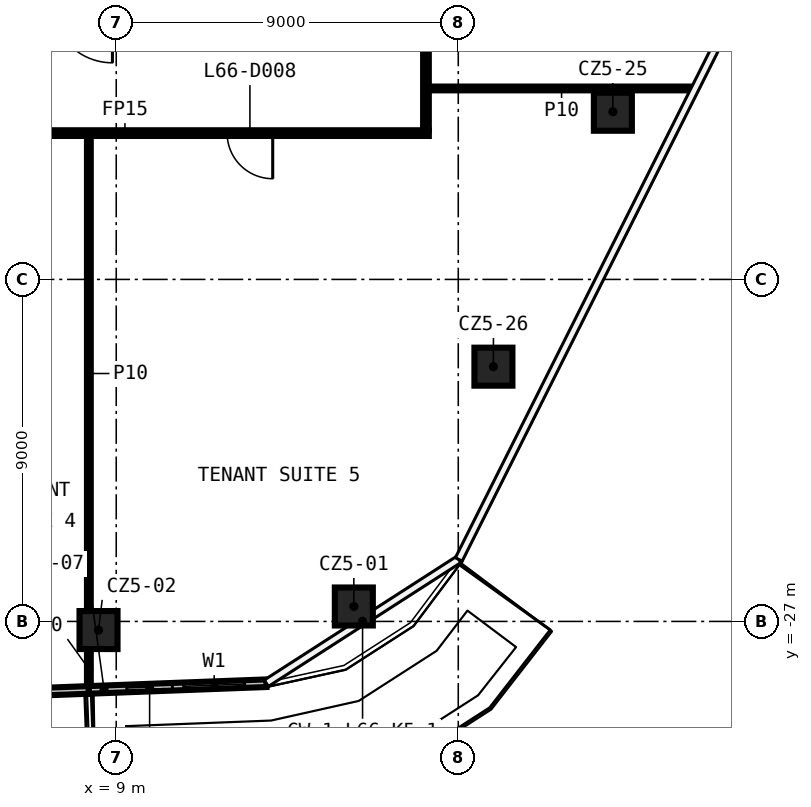
"""IFC4 building model, lengths in metres.
Left out: names, types, materials, properties, quantities, classifications, styles, units other than length and angle.
Written with IfcOpenShell. Run it as: python <this file> out.ifc"""

import sys

from ifc_helpers import new_model, si_unit, direction, frame, frame_2d, origin, origin_2d, place, context, subcontext, project, spatial, rectangle, extrude, element, fill, save


model = new_model("IFC4")
c1 = context("Model", 3, precision=1e-05, world=origin(), true_north=direction((0.0, 1.0)))
c2 = subcontext(c1, "Body", "Model", "MODEL_VIEW")
j1 = project(units=[si_unit("LENGTHUNIT", "METRE"), si_unit("PLANEANGLEUNIT", "RADIAN")], contexts=[c1])
p1 = place(None, origin())
s1 = spatial("IfcSite", under=j1, at=p1, CompositionType="ELEMENT")
p2 = place(p1, origin())
s2 = spatial("IfcBuilding", under=s1, at=p2, CompositionType="ELEMENT")
p3 = place(p2, frame((0.0, 0.0, 311.0)))
s3 = spatial("IfcBuildingStorey", under=s2, at=p3, CompositionType="ELEMENT", Elevation=311.0)
for number, where, z_axis, x_axis in (
    (1, (15.252, -26.607, 0.0), (0.0, 0.0, 1.0), (1.0, 0.0, 0.0)),
    (2, (8.534, -27.227, 0.0), (0.0, 0.0, 1.0), (1.0, 0.0, 0.0)),
    (3, (22.068, -13.588, 0.0), (0.0, 0.0, 1.0), (1.0, 0.0, 0.0)),
    (4, (18.925, -20.296, 0.0), (0.0, 0.0, 1.0), (1.0, 0.0, 0.0)),
):
    element("IfcColumn", number, at=place(p3, frame(where, z_axis=z_axis, x_axis=x_axis)), inside=s3, PredefinedType="COLUMN", context=c2, shape_type="SweptSolid", body=[
        extrude(rectangle(XDim=1.0, YDim=1.0, at=origin_2d()), origin(), (0.0, 0.0, 1.0), 3.82),
    ])
p4 = place(p3, frame((17.225, -14.15, 0.0), z_axis=(0.0, 0.0, 1.0), x_axis=(-1.0, 0.0, 0.0)))
e5 = element("IfcWall", 5, at=p4, inside=s3, PredefinedType="PARTITIONING", context=c2, shape_type="SweptSolid", body=[
    extrude(rectangle(XDim=34.45, YDim=0.15, at=frame_2d((17.225, 0.0))), origin(), (0.0, 0.0, 1.0), 3.82),
])
p5 = place(p4, frame((31.269, 0.0, 0.0)))
e6 = element("IfcOpeningElement", 6, at=p5, cuts=e5, PredefinedType="OPENING", context=c2, shape_type="SweptSolid", body=[
    extrude(rectangle(XDim=1.2, YDim=2.1, at=frame_2d((0.6, 1.05))), frame((0.0, 0.085, 0.0), z_axis=(0.0, -1.0, 0.0), x_axis=(1.0, 0.0, 0.0)), (0.0, 0.0, 1.0), 0.17),
])
p6 = place(p4, frame((24.719, 0.0, 0.0)))
e7 = element("IfcOpeningElement", 7, at=p6, cuts=e5, PredefinedType="OPENING", context=c2, shape_type="SweptSolid", body=[
    extrude(rectangle(XDim=1.2, YDim=2.1, at=frame_2d((0.6, 1.05))), frame((0.0, 0.085, 0.0), z_axis=(0.0, -1.0, 0.0), x_axis=(1.0, 0.0, 0.0)), (0.0, 0.0, 1.0), 0.17),
])
p7 = place(p4, frame((20.044, 0.0, 0.0)))
e8 = element("IfcOpeningElement", 8, at=p7, cuts=e5, PredefinedType="OPENING", context=c2, shape_type="SweptSolid", body=[
    extrude(rectangle(XDim=1.2, YDim=2.1, at=frame_2d((0.6, 1.05))), frame((0.0, 0.085, 0.0), z_axis=(0.0, -1.0, 0.0), x_axis=(1.0, 0.0, 0.0)), (0.0, 0.0, 1.0), 0.17),
])
p8 = place(p4, frame((15.364, 0.0, 0.0)))
e9 = element("IfcOpeningElement", 9, at=p8, cuts=e5, PredefinedType="OPENING", context=c2, shape_type="SweptSolid", body=[
    extrude(rectangle(XDim=1.2, YDim=2.1, at=frame_2d((0.6, 1.05))), frame((0.0, 0.085, 0.0), z_axis=(0.0, -1.0, 0.0), x_axis=(1.0, 0.0, 0.0)), (0.0, 0.0, 1.0), 0.17),
])
p9 = place(p4, frame((10.685, 0.0, 0.0)))
e10 = element("IfcOpeningElement", 10, at=p9, cuts=e5, PredefinedType="OPENING", context=c2, shape_type="SweptSolid", body=[
    extrude(rectangle(XDim=1.2, YDim=2.1, at=frame_2d((0.6, 1.05))), frame((0.0, 0.085, 0.0), z_axis=(0.0, -1.0, 0.0), x_axis=(1.0, 0.0, 0.0)), (0.0, 0.0, 1.0), 0.17),
])
p10 = place(p4, frame((4.107, 0.0, 0.0)))
e11 = element("IfcOpeningElement", 11, at=p10, cuts=e5, PredefinedType="OPENING", context=c2, shape_type="SweptSolid", body=[
    extrude(rectangle(XDim=1.2, YDim=2.1, at=frame_2d((0.6, 1.05))), frame((0.0, 0.085, 0.0), z_axis=(0.0, -1.0, 0.0), x_axis=(1.0, 0.0, 0.0)), (0.0, 0.0, 1.0), 0.17),
])
p11 = place(p3, frame((17.225, -12.975, 0.0), z_axis=(0.0, 0.0, 1.0), x_axis=(1.0, 0.0, 0.0)))
e12 = element("IfcWall", 12, at=p11, inside=s3, PredefinedType="PARTITIONING", context=c2, shape_type="SweptSolid", body=[
    extrude(rectangle(XDim=6.987, YDim=0.1, at=frame_2d((3.493, 0.0))), origin(), (0.0, 0.0, 1.0), 3.82),
])
p12 = place(p3, frame((17.15, 14.075, 0.0), z_axis=(0.0, 0.0, 1.0), x_axis=(0.0, -1.0, 0.0)))
e13 = element("IfcWall", 13, at=p12, inside=s3, PredefinedType="PARTITIONING", context=c2, shape_type="SweptSolid", body=[
    extrude(rectangle(XDim=28.15, YDim=0.15, at=frame_2d((14.075, 0.0))), origin(), (0.0, 0.0, 1.0), 3.82),
])
p13 = place(p12, frame((18.182, 0.0, 0.0)))
e14 = element("IfcOpeningElement", 14, at=p13, cuts=e13, PredefinedType="OPENING", context=c2, shape_type="SweptSolid", body=[
    extrude(rectangle(XDim=1.2, YDim=2.1, at=frame_2d((0.6, 1.05))), frame((0.0, 0.085, 0.0), z_axis=(0.0, -1.0, 0.0), x_axis=(1.0, 0.0, 0.0)), (0.0, 0.0, 1.0), 0.17),
])
p14 = place(p12, frame((10.811, 0.0, 0.0)))
e15 = element("IfcOpeningElement", 15, at=p14, cuts=e13, PredefinedType="OPENING", context=c2, shape_type="SweptSolid", body=[
    extrude(rectangle(XDim=1.2, YDim=2.1, at=frame_2d((0.6, 1.05))), frame((0.0, 0.085, 0.0), z_axis=(0.0, -1.0, 0.0), x_axis=(1.0, 0.0, 0.0)), (0.0, 0.0, 1.0), 0.17),
])
p15 = place(p12, frame((3.647, 0.0, 0.0)))
e16 = element("IfcOpeningElement", 16, at=p15, cuts=e13, PredefinedType="OPENING", context=c2, shape_type="SweptSolid", body=[
    extrude(rectangle(XDim=1.2, YDim=2.1, at=frame_2d((0.6, 1.05))), frame((0.0, 0.085, 0.0), z_axis=(0.0, -1.0, 0.0), x_axis=(1.0, 0.0, 0.0)), (0.0, 0.0, 1.0), 0.17),
])
p16 = place(p3, frame((8.28, -28.782, 0.0), z_axis=(0.0, 0.0, 1.0), x_axis=(0.0, 1.0, 0.0)))
e17 = element("IfcWall", 17, at=p16, inside=s3, PredefinedType="PARTITIONING", context=c2, shape_type="SweptSolid", body=[
    extrude(rectangle(XDim=1.055, YDim=0.1, at=frame_2d((0.528, 0.0))), origin(), (0.0, 0.0, 1.0), 3.82),
])
p17 = place(p3, frame((8.28, -26.727, 0.0), z_axis=(0.0, 0.0, 1.0), x_axis=(0.0, 1.0, 0.0)))
e18 = element("IfcWall", 18, at=p17, inside=s3, PredefinedType="PARTITIONING", context=c2, shape_type="SweptSolid", body=[
    extrude(rectangle(XDim=12.502, YDim=0.1, at=frame_2d((6.251, 0.0))), origin(), (0.0, 0.0, 1.0), 3.82),
])
p18 = place(p3, frame((-1.079, -29.156, 0.0), z_axis=(0.0, 0.0, 1.0), x_axis=(0.999288261827, 0.037722271597, 0.0)))
e19 = element("IfcWall", 19, at=p18, inside=s3, PredefinedType="SOLIDWALL", context=c2, shape_type="SweptSolid", body=[
    extrude(rectangle(XDim=9.365, YDim=0.2, at=frame_2d((4.683, 0.0))), origin(), (0.0, 0.0, 1.0), 3.82),
])
p19 = place(p18, frame((2.0, 0.0, 0.6)))
e20 = element("IfcOpeningElement", 20, at=p19, cuts=e19, PredefinedType="OPENING", context=c2, shape_type="SweptSolid", body=[
    extrude(rectangle(XDim=1.6, YDim=2.4, at=frame_2d((0.8, 1.2))), frame((0.0, 0.11, 0.0), z_axis=(0.0, -1.0, 0.0), x_axis=(1.0, 0.0, 0.0)), (0.0, 0.0, 1.0), 0.22),
])
p20 = place(p18, frame((0.5, 0.0, 0.0)))
e21 = element("IfcOpeningElement", 21, at=p20, cuts=e19, PredefinedType="OPENING", context=c2, shape_type="SweptSolid", body=[
    extrude(rectangle(XDim=1.2, YDim=2.4, at=frame_2d((0.6, 1.2))), frame((0.0, 0.11, 0.0), z_axis=(0.0, -1.0, 0.0), x_axis=(1.0, 0.0, 0.0)), (0.0, 0.0, 1.0), 0.22),
])
p21 = place(p18, frame((6.683, 0.0, 0.6)))
e22 = element("IfcOpeningElement", 22, at=p21, cuts=e19, PredefinedType="OPENING", context=c2, shape_type="SweptSolid", body=[
    extrude(rectangle(XDim=1.6, YDim=2.4, at=frame_2d((0.8, 1.2))), frame((0.0, 0.11, 0.0), z_axis=(0.0, -1.0, 0.0), x_axis=(1.0, 0.0, 0.0)), (0.0, 0.0, 1.0), 0.22),
])
p22 = place(p18, frame((5.183, 0.0, 0.0)))
e23 = element("IfcOpeningElement", 23, at=p22, cuts=e19, PredefinedType="OPENING", context=c2, shape_type="SweptSolid", body=[
    extrude(rectangle(XDim=1.2, YDim=2.4, at=frame_2d((0.6, 1.2))), frame((0.0, 0.11, 0.0), z_axis=(0.0, -1.0, 0.0), x_axis=(1.0, 0.0, 0.0)), (0.0, 0.0, 1.0), 0.22),
])
p23 = place(p3, frame((8.28, -28.802, 0.0), z_axis=(0.0, 0.0, 1.0), x_axis=(0.999288539502, 0.037714915082, 0.0)))
e24 = element("IfcWall", 24, at=p23, inside=s3, PredefinedType="SOLIDWALL", context=c2, shape_type="SweptSolid", body=[
    extrude(rectangle(XDim=4.674, YDim=0.2, at=frame_2d((2.337, 0.0))), origin(), (0.0, 0.0, 1.0), 3.82),
])
p24 = place(p23, frame((2.5, 0.0, 0.6)))
e25 = element("IfcOpeningElement", 25, at=p24, cuts=e24, PredefinedType="OPENING", context=c2, shape_type="SweptSolid", body=[
    extrude(rectangle(XDim=1.6, YDim=2.4, at=frame_2d((0.8, 1.2))), frame((0.0, 0.11, 0.0), z_axis=(0.0, -1.0, 0.0), x_axis=(1.0, 0.0, 0.0)), (0.0, 0.0, 1.0), 0.22),
])
p25 = place(p23, frame((1.0, 0.0, 0.0)))
e26 = element("IfcOpeningElement", 26, at=p25, cuts=e24, PredefinedType="OPENING", context=c2, shape_type="SweptSolid", body=[
    extrude(rectangle(XDim=1.2, YDim=2.4, at=frame_2d((0.6, 1.2))), frame((0.0, 0.11, 0.0), z_axis=(0.0, -1.0, 0.0), x_axis=(1.0, 0.0, 0.0)), (0.0, 0.0, 1.0), 0.22),
])
p26 = place(p10, origin())
e27 = element("IfcDoor", 27, at=p26, inside=s3, OperationType="SINGLE_SWING_LEFT", PredefinedType="DOOR", context=c2, shape_type="SweptSolid", body=[
    extrude(rectangle(XDim=1.2, YDim=2.1, at=frame_2d((0.6, 1.05))), frame((0.0, 0.025, 0.0), z_axis=(0.0, -1.0, 0.0), x_axis=(1.0, 0.0, 0.0)), (0.0, 0.0, 1.0), 0.05),
])
fill(e11, e27)
p27 = place(p24, origin())
e28 = element("IfcWindow", 28, at=p27, inside=s3, PartitioningType="SINGLE_PANEL", PredefinedType="WINDOW", context=c2, shape_type="SweptSolid", body=[
    extrude(rectangle(XDim=1.6, YDim=2.4, at=frame_2d((0.8, 1.2))), frame((0.0, 0.03, 0.0), z_axis=(0.0, -1.0, 0.0), x_axis=(1.0, 0.0, 0.0)), (0.0, 0.0, 1.0), 0.06),
])
fill(e25, e28)
p28 = place(p25, origin())
e29 = element("IfcDoor", 29, at=p28, inside=s3, OperationType="SLIDING_TO_LEFT", PredefinedType="DOOR", context=c2, shape_type="SweptSolid", body=[
    extrude(rectangle(XDim=1.2, YDim=2.4, at=frame_2d((0.6, 1.2))), frame((0.0, 0.025, 0.0), z_axis=(0.0, -1.0, 0.0), x_axis=(1.0, 0.0, 0.0)), (0.0, 0.0, 1.0), 0.05),
])
fill(e26, e29)
save(model, sys.argv[1])
